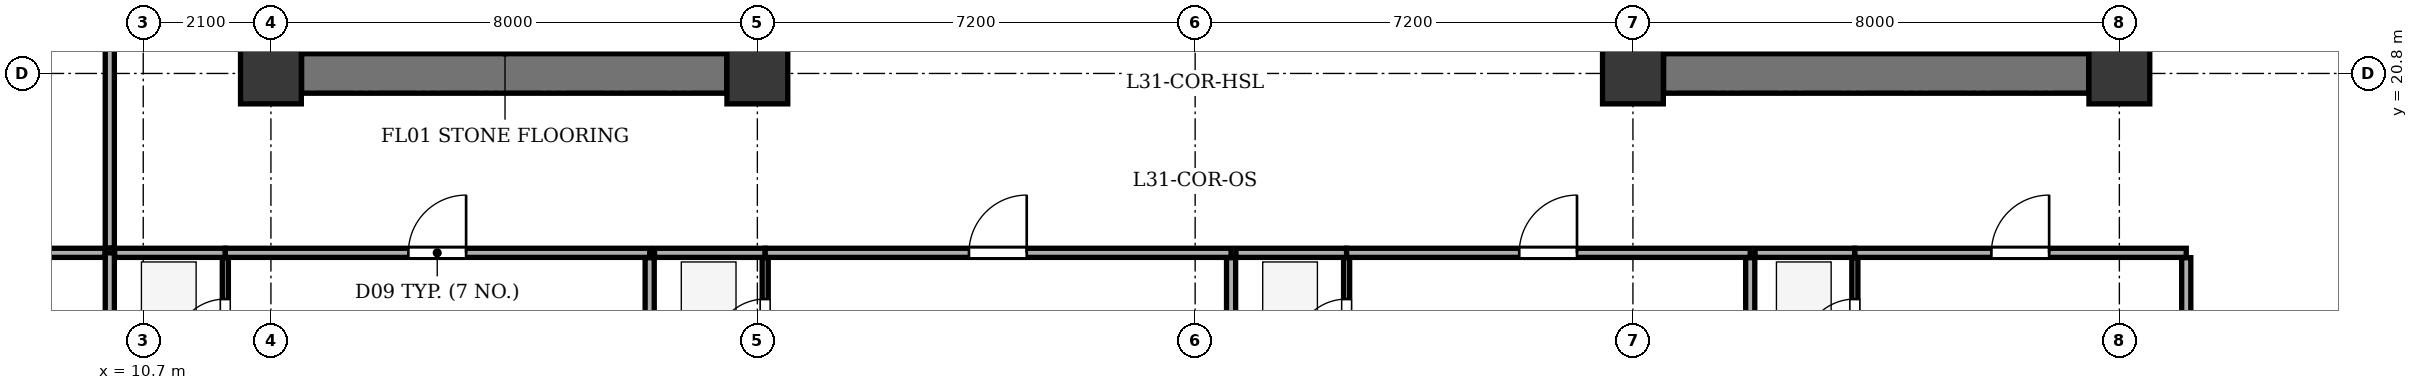
"""IFC4 building model, lengths in metres.
Left out: names, types, materials, properties, quantities, classifications, styles, units other than length and angle.
Written with IfcOpenShell. Run it as: python <this file> out.ifc"""

import sys

from ifc_helpers import new_model, si_unit, direction, frame, frame_2d, origin, origin_2d, place, context, subcontext, project, spatial, rectangle, extrude, element, fill, save


model = new_model("IFC4")
c1 = context("Model", 3, precision=1e-05, world=origin(), true_north=direction((0.0, 1.0)))
c2 = subcontext(c1, "Body", "Model", "MODEL_VIEW")
j1 = project(units=[si_unit("LENGTHUNIT", "METRE"), si_unit("PLANEANGLEUNIT", "RADIAN")], contexts=[c1])
p1 = place(None, origin())
s1 = spatial("IfcSite", under=j1, at=p1, CompositionType="ELEMENT")
p2 = place(p1, origin())
s2 = spatial("IfcBuilding", under=s1, at=p2, CompositionType="ELEMENT")
p3 = place(p2, frame((0.0, 0.0, 127.3)))
s3 = spatial("IfcBuildingStorey", under=s2, at=p3, CompositionType="ELEMENT", Elevation=127.3)
for number, where, z_axis, x_axis in (
    (1, (12.8, 20.8, 0.0), (0.0, 0.0, 1.0), (1.0, 0.0, 0.0)),
    (2, (20.8, 20.8, 0.0), (0.0, 0.0, 1.0), (1.0, 0.0, 0.0)),
    (3, (35.2, 20.8, 0.0), (0.0, 0.0, 1.0), (1.0, 0.0, 0.0)),
    (4, (43.2, 20.8, 0.0), (0.0, 0.0, 1.0), (1.0, 0.0, 0.0)),
):
    element("IfcColumn", number, at=place(p3, frame(where, z_axis=z_axis, x_axis=x_axis)), inside=s3, PredefinedType="COLUMN", context=c2, shape_type="SweptSolid", body=[
        extrude(rectangle(XDim=1.0, YDim=1.0, at=origin_2d()), origin(), (0.0, 0.0, 1.0), 3.5),
    ])
p4 = place(p3, frame((13.305, 20.8, 0.0), z_axis=(0.0, 0.0, 1.0), x_axis=(1.0, 0.0, 0.0)))
e5 = element("IfcWall", 5, at=p4, inside=s3, PredefinedType="SHEAR", context=c2, shape_type="SweptSolid", body=[
    extrude(rectangle(XDim=6.99, YDim=0.65, at=frame_2d((3.495, 0.0))), origin(), (0.0, 0.0, 1.0), 3.2),
])
p5 = place(p3, frame((16.435, 21.135, 0.0), z_axis=(0.0, 0.0, 1.0), x_axis=(0.0, 1.0, 0.0)))
e6 = element("IfcWall", 6, at=p5, inside=s3, PredefinedType="SHEAR", context=c2, shape_type="SweptSolid", body=[
    extrude(rectangle(XDim=12.13, YDim=0.25, at=frame_2d((6.065, 0.0))), origin(), (0.0, 0.0, 1.0), 3.2),
])
p6 = place(p5, frame((0.515, 0.0, 0.0)))
e7 = element("IfcOpeningElement", 7, at=p6, cuts=e6, PredefinedType="OPENING", context=c2, shape_type="SweptSolid", body=[
    extrude(rectangle(XDim=1.2, YDim=2.15, at=frame_2d((0.6, 1.075))), frame((0.0, 0.135, 0.0), z_axis=(0.0, -1.0, 0.0), x_axis=(1.0, 0.0, 0.0)), (0.0, 0.0, 1.0), 0.27),
])
p7 = place(p5, frame((2.665, 0.0, 0.0)))
e8 = element("IfcOpeningElement", 8, at=p7, cuts=e6, PredefinedType="OPENING", context=c2, shape_type="SweptSolid", body=[
    extrude(rectangle(XDim=1.15, YDim=2.15, at=frame_2d((0.575, 1.075))), frame((0.0, 0.135, 0.0), z_axis=(0.0, -1.0, 0.0), x_axis=(1.0, 0.0, 0.0)), (0.0, 0.0, 1.0), 0.27),
])
p8 = place(p3, frame((35.705, 20.8, 0.0), z_axis=(0.0, 0.0, 1.0), x_axis=(1.0, 0.0, 0.0)))
e9 = element("IfcWall", 9, at=p8, inside=s3, PredefinedType="SHEAR", context=c2, shape_type="SweptSolid", body=[
    extrude(rectangle(XDim=6.99, YDim=0.65, at=frame_2d((3.495, 0.0))), origin(), (0.0, 0.0, 1.0), 3.2),
])
p9 = place(p3, frame((39.565, 21.135, 0.0), z_axis=(0.0, 0.0, 1.0), x_axis=(0.0, 1.0, 0.0)))
e10 = element("IfcWall", 10, at=p9, inside=s3, PredefinedType="SHEAR", context=c2, shape_type="SweptSolid", body=[
    extrude(rectangle(XDim=12.13, YDim=0.25, at=frame_2d((6.065, 0.0))), origin(), (0.0, 0.0, 1.0), 3.2),
])
p10 = place(p9, frame((0.515, 0.0, 0.0)))
e11 = element("IfcOpeningElement", 11, at=p10, cuts=e10, PredefinedType="OPENING", context=c2, shape_type="SweptSolid", body=[
    extrude(rectangle(XDim=1.2, YDim=2.15, at=frame_2d((0.6, 1.075))), frame((0.0, 0.135, 0.0), z_axis=(0.0, -1.0, 0.0), x_axis=(1.0, 0.0, 0.0)), (0.0, 0.0, 1.0), 0.27),
])
p11 = place(p9, frame((2.665, 0.0, 0.0)))
e12 = element("IfcOpeningElement", 12, at=p11, cuts=e10, PredefinedType="OPENING", context=c2, shape_type="SweptSolid", body=[
    extrude(rectangle(XDim=1.15, YDim=2.15, at=frame_2d((0.575, 1.075))), frame((0.0, 0.135, 0.0), z_axis=(0.0, -1.0, 0.0), x_axis=(1.0, 0.0, 0.0)), (0.0, 0.0, 1.0), 0.27),
])
p12 = place(p3, frame((10.15, 1.875, 0.0), z_axis=(0.0, 0.0, 1.0), x_axis=(0.0, 1.0, 0.0)))
e13 = element("IfcWall", 13, at=p12, inside=s3, PredefinedType="PARTITIONING", context=c2, shape_type="SweptSolid", body=[
    extrude(rectangle(XDim=15.975, YDim=0.15, at=frame_2d((7.988, 0.0))), origin(), (0.0, 0.0, 1.0), 3.2),
])
p13 = place(p3, frame((10.23, 17.85, 0.0), z_axis=(0.0, 0.0, 1.0), x_axis=(1.0, 0.0, 0.0)))
e14 = element("IfcWall", 14, at=p13, inside=s3, PredefinedType="PARTITIONING", context=c2, shape_type="SweptSolid", body=[
    extrude(rectangle(XDim=1.82, YDim=0.15, at=frame_2d((0.91, 0.0))), origin(), (0.0, 0.0, 1.0), 3.2),
])
p14 = place(p3, frame((12.05, 17.85, 0.0), z_axis=(0.0, 0.0, 1.0), x_axis=(1.0, 0.0, 0.0)))
e15 = element("IfcWall", 15, at=p14, inside=s3, PredefinedType="PARTITIONING", context=c2, shape_type="SweptSolid", body=[
    extrude(rectangle(XDim=6.979, YDim=0.15, at=frame_2d((3.49, 0.0))), origin(), (0.0, 0.0, 1.0), 3.2),
])
p15 = place(p14, frame((3.01, 0.0, 0.0)))
e16 = element("IfcOpeningElement", 16, at=p15, cuts=e15, PredefinedType="OPENING", context=c2, shape_type="SweptSolid", body=[
    extrude(rectangle(XDim=0.95, YDim=2.1, at=frame_2d((0.475, 1.05))), frame((0.0, 0.085, 0.0), z_axis=(0.0, -1.0, 0.0), x_axis=(1.0, 0.0, 0.0)), (0.0, 0.0, 1.0), 0.17),
])
p16 = place(p3, frame((12.05, 15.52, 0.0), z_axis=(0.0, 0.0, 1.0), x_axis=(0.0, 1.0, 0.0)))
e17 = element("IfcWall", 17, at=p16, inside=s3, PredefinedType="PARTITIONING", context=c2, shape_type="SweptSolid", body=[
    extrude(rectangle(XDim=2.25, YDim=0.1, at=frame_2d((1.125, 0.0))), origin(), (0.0, 0.0, 1.0), 3.2),
])
p17 = place(p16, frame((0.72, 0.0, 0.0)))
e18 = element("IfcOpeningElement", 18, at=p17, cuts=e17, PredefinedType="OPENING", context=c2, shape_type="SweptSolid", body=[
    extrude(rectangle(XDim=0.85, YDim=2.05, at=frame_2d((0.425, 1.025))), frame((0.0, 0.06, 0.0), z_axis=(0.0, -1.0, 0.0), x_axis=(1.0, 0.0, 0.0)), (0.0, 0.0, 1.0), 0.12),
])
p18 = place(p3, frame((19.029, 1.875, 0.0), z_axis=(0.0, 0.0, 1.0), x_axis=(0.0, 1.0, 0.0)))
e19 = element("IfcWall", 19, at=p18, inside=s3, PredefinedType="PARTITIONING", context=c2, shape_type="SweptSolid", body=[
    extrude(rectangle(XDim=15.895, YDim=0.15, at=frame_2d((7.948, 0.0))), origin(), (0.0, 0.0, 1.0), 3.2),
])
p19 = place(p3, frame((19.109, 17.85, 0.0), z_axis=(0.0, 0.0, 1.0), x_axis=(1.0, 0.0, 0.0)))
e20 = element("IfcWall", 20, at=p19, inside=s3, PredefinedType="PARTITIONING", context=c2, shape_type="SweptSolid", body=[
    extrude(rectangle(XDim=1.82, YDim=0.15, at=frame_2d((0.91, 0.0))), origin(), (0.0, 0.0, 1.0), 3.2),
])
p20 = place(p3, frame((20.929, 17.85, 0.0), z_axis=(0.0, 0.0, 1.0), x_axis=(1.0, 0.0, 0.0)))
e21 = element("IfcWall", 21, at=p20, inside=s3, PredefinedType="PARTITIONING", context=c2, shape_type="SweptSolid", body=[
    extrude(rectangle(XDim=7.662, YDim=0.15, at=frame_2d((3.831, 0.0))), origin(), (0.0, 0.0, 1.0), 3.2),
])
p21 = place(p20, frame((3.351, 0.0, 0.0)))
e22 = element("IfcOpeningElement", 22, at=p21, cuts=e21, PredefinedType="OPENING", context=c2, shape_type="SweptSolid", body=[
    extrude(rectangle(XDim=0.95, YDim=2.1, at=frame_2d((0.475, 1.05))), frame((0.0, 0.085, 0.0), z_axis=(0.0, -1.0, 0.0), x_axis=(1.0, 0.0, 0.0)), (0.0, 0.0, 1.0), 0.17),
])
p22 = place(p3, frame((20.929, 15.52, 0.0), z_axis=(0.0, 0.0, 1.0), x_axis=(0.0, 1.0, 0.0)))
e23 = element("IfcWall", 23, at=p22, inside=s3, PredefinedType="PARTITIONING", context=c2, shape_type="SweptSolid", body=[
    extrude(rectangle(XDim=2.25, YDim=0.1, at=frame_2d((1.125, 0.0))), origin(), (0.0, 0.0, 1.0), 2.535),
])
p23 = place(p22, frame((0.72, 0.0, 0.0)))
e24 = element("IfcOpeningElement", 24, at=p23, cuts=e23, PredefinedType="OPENING", context=c2, shape_type="SweptSolid", body=[
    extrude(rectangle(XDim=0.85, YDim=2.05, at=frame_2d((0.425, 1.025))), frame((0.0, 0.06, 0.0), z_axis=(0.0, -1.0, 0.0), x_axis=(1.0, 0.0, 0.0)), (0.0, 0.0, 1.0), 0.12),
])
p24 = place(p3, frame((28.591, 1.875, 0.0), z_axis=(0.0, 0.0, 1.0), x_axis=(0.0, 1.0, 0.0)))
e25 = element("IfcWall", 25, at=p24, inside=s3, PredefinedType="PARTITIONING", context=c2, shape_type="SweptSolid", body=[
    extrude(rectangle(XDim=15.895, YDim=0.15, at=frame_2d((7.948, 0.0))), origin(), (0.0, 0.0, 1.0), 3.2),
])
p25 = place(p3, frame((28.671, 17.85, 0.0), z_axis=(0.0, 0.0, 1.0), x_axis=(1.0, 0.0, 0.0)))
e26 = element("IfcWall", 26, at=p25, inside=s3, PredefinedType="PARTITIONING", context=c2, shape_type="SweptSolid", body=[
    extrude(rectangle(XDim=1.82, YDim=0.15, at=frame_2d((0.91, 0.0))), origin(), (0.0, 0.0, 1.0), 3.2),
])
p26 = place(p3, frame((30.491, 17.85, 0.0), z_axis=(0.0, 0.0, 1.0), x_axis=(1.0, 0.0, 0.0)))
e27 = element("IfcWall", 27, at=p26, inside=s3, PredefinedType="PARTITIONING", context=c2, shape_type="SweptSolid", body=[
    extrude(rectangle(XDim=6.638, YDim=0.15, at=frame_2d((3.319, 0.0))), origin(), (0.0, 0.0, 1.0), 3.2),
])
p27 = place(p26, frame((2.839, 0.0, 0.0)))
e28 = element("IfcOpeningElement", 28, at=p27, cuts=e27, PredefinedType="OPENING", context=c2, shape_type="SweptSolid", body=[
    extrude(rectangle(XDim=0.95, YDim=2.1, at=frame_2d((0.475, 1.05))), frame((0.0, 0.085, 0.0), z_axis=(0.0, -1.0, 0.0), x_axis=(1.0, 0.0, 0.0)), (0.0, 0.0, 1.0), 0.17),
])
p28 = place(p3, frame((30.491, 15.52, 0.0), z_axis=(0.0, 0.0, 1.0), x_axis=(0.0, 1.0, 0.0)))
e29 = element("IfcWall", 29, at=p28, inside=s3, PredefinedType="PARTITIONING", context=c2, shape_type="SweptSolid", body=[
    extrude(rectangle(XDim=2.25, YDim=0.1, at=frame_2d((1.125, 0.0))), origin(), (0.0, 0.0, 1.0), 3.2),
])
p29 = place(p28, frame((0.72, 0.0, 0.0)))
e30 = element("IfcOpeningElement", 30, at=p29, cuts=e29, PredefinedType="OPENING", context=c2, shape_type="SweptSolid", body=[
    extrude(rectangle(XDim=0.85, YDim=2.05, at=frame_2d((0.425, 1.025))), frame((0.0, 0.06, 0.0), z_axis=(0.0, -1.0, 0.0), x_axis=(1.0, 0.0, 0.0)), (0.0, 0.0, 1.0), 0.12),
])
p30 = place(p3, frame((37.129, 1.875, 0.0), z_axis=(0.0, 0.0, 1.0), x_axis=(0.0, 1.0, 0.0)))
e31 = element("IfcWall", 31, at=p30, inside=s3, PredefinedType="PARTITIONING", context=c2, shape_type="SweptSolid", body=[
    extrude(rectangle(XDim=15.895, YDim=0.15, at=frame_2d((7.948, 0.0))), origin(), (0.0, 0.0, 1.0), 3.2),
])
p31 = place(p3, frame((37.209, 17.85, 0.0), z_axis=(0.0, 0.0, 1.0), x_axis=(1.0, 0.0, 0.0)))
e32 = element("IfcWall", 32, at=p31, inside=s3, PredefinedType="PARTITIONING", context=c2, shape_type="SweptSolid", body=[
    extrude(rectangle(XDim=1.641, YDim=0.15, at=frame_2d((0.821, 0.0))), origin(), (0.0, 0.0, 1.0), 3.2),
])
p32 = place(p3, frame((38.85, 17.85, 0.0), z_axis=(0.0, 0.0, 1.0), x_axis=(1.0, 0.0, 0.0)))
e33 = element("IfcWall", 33, at=p32, inside=s3, PredefinedType="PARTITIONING", context=c2, shape_type="SweptSolid", body=[
    extrude(rectangle(XDim=5.45, YDim=0.15, at=frame_2d((2.725, 0.0))), origin(), (0.0, 0.0, 1.0), 3.2),
])
p33 = place(p32, frame((2.245, 0.0, 0.0)))
e34 = element("IfcOpeningElement", 34, at=p33, cuts=e33, PredefinedType="OPENING", context=c2, shape_type="SweptSolid", body=[
    extrude(rectangle(XDim=0.95, YDim=2.1, at=frame_2d((0.475, 1.05))), frame((0.0, 0.085, 0.0), z_axis=(0.0, -1.0, 0.0), x_axis=(1.0, 0.0, 0.0)), (0.0, 0.0, 1.0), 0.17),
])
p34 = place(p3, frame((38.85, 15.52, 0.0), z_axis=(0.0, 0.0, 1.0), x_axis=(0.0, 1.0, 0.0)))
e35 = element("IfcWall", 35, at=p34, inside=s3, PredefinedType="PARTITIONING", context=c2, shape_type="SweptSolid", body=[
    extrude(rectangle(XDim=2.25, YDim=0.1, at=frame_2d((1.125, 0.0))), origin(), (0.0, 0.0, 1.0), 3.2),
])
p35 = place(p34, frame((0.72, 0.0, 0.0)))
e36 = element("IfcOpeningElement", 36, at=p35, cuts=e35, PredefinedType="OPENING", context=c2, shape_type="SweptSolid", body=[
    extrude(rectangle(XDim=0.85, YDim=2.05, at=frame_2d((0.425, 1.025))), frame((0.0, 0.06, 0.0), z_axis=(0.0, -1.0, 0.0), x_axis=(1.0, 0.0, 0.0)), (0.0, 0.0, 1.0), 0.12),
])
p36 = place(p3, frame((44.3, 1.875, 0.0), z_axis=(0.0, 0.0, 1.0), x_axis=(0.0, 1.0, 0.0)))
e37 = element("IfcWall", 37, at=p36, inside=s3, PredefinedType="PARTITIONING", context=c2, shape_type="SweptSolid", body=[
    extrude(rectangle(XDim=15.895, YDim=0.15, at=frame_2d((7.948, 0.0))), origin(), (0.0, 0.0, 1.0), 3.2),
])
p37 = place(p3, frame((4.675, 17.85, 0.0), z_axis=(0.0, 0.0, 1.0), x_axis=(1.0, 0.0, 0.0)))
e38 = element("IfcWall", 38, at=p37, inside=s3, PredefinedType="PARTITIONING", context=c2, shape_type="SweptSolid", body=[
    extrude(rectangle(XDim=5.395, YDim=0.15, at=frame_2d((2.698, 0.0))), origin(), (0.0, 0.0, 1.0), 3.2),
])
p38 = place(p3, frame((10.15, 17.93, 0.0), z_axis=(0.0, 0.0, 1.0), x_axis=(0.0, 1.0, 0.0)))
e39 = element("IfcWall", 39, at=p38, inside=s3, PredefinedType="PARTITIONING", context=c2, shape_type="SweptSolid", body=[
    extrude(rectangle(XDim=18.54, YDim=0.15, at=frame_2d((9.27, 0.0))), origin(), (0.0, 0.0, 1.0), 3.2),
])
p39 = place(p38, frame((8.79, 0.0, 0.0)))
e40 = element("IfcOpeningElement", 40, at=p39, cuts=e39, PredefinedType="OPENING", context=c2, shape_type="SweptSolid", body=[
    extrude(rectangle(XDim=0.95, YDim=2.1, at=frame_2d((0.475, 1.05))), frame((0.0, 0.085, 0.0), z_axis=(0.0, -1.0, 0.0), x_axis=(1.0, 0.0, 0.0)), (0.0, 0.0, 1.0), 0.17),
])
p40 = place(p17, origin())
e41 = element("IfcDoor", 41, at=p40, inside=s3, OperationType="SINGLE_SWING_LEFT", PredefinedType="DOOR", context=c2, shape_type="SweptSolid", body=[
    extrude(rectangle(XDim=0.85, YDim=2.05, at=frame_2d((0.425, 1.025))), frame((0.0, 0.025, 0.0), z_axis=(0.0, -1.0, 0.0), x_axis=(1.0, 0.0, 0.0)), (0.0, 0.0, 1.0), 0.05),
])
fill(e18, e41)
p41 = place(p15, origin())
e42 = element("IfcDoor", 42, at=p41, inside=s3, OperationType="SINGLE_SWING_RIGHT", PredefinedType="DOOR", context=c2, shape_type="SweptSolid", body=[
    extrude(rectangle(XDim=0.95, YDim=2.1, at=frame_2d((0.475, 1.05))), frame((0.0, 0.025, 0.0), z_axis=(0.0, -1.0, 0.0), x_axis=(1.0, 0.0, 0.0)), (0.0, 0.0, 1.0), 0.05),
])
fill(e16, e42)
p42 = place(p23, origin())
e43 = element("IfcDoor", 43, at=p42, inside=s3, OperationType="SINGLE_SWING_LEFT", PredefinedType="DOOR", context=c2, shape_type="SweptSolid", body=[
    extrude(rectangle(XDim=0.85, YDim=2.05, at=frame_2d((0.425, 1.025))), frame((0.0, 0.025, 0.0), z_axis=(0.0, -1.0, 0.0), x_axis=(1.0, 0.0, 0.0)), (0.0, 0.0, 1.0), 0.05),
])
fill(e24, e43)
p43 = place(p21, origin())
e44 = element("IfcDoor", 44, at=p43, inside=s3, OperationType="SINGLE_SWING_RIGHT", PredefinedType="DOOR", context=c2, shape_type="SweptSolid", body=[
    extrude(rectangle(XDim=0.95, YDim=2.1, at=frame_2d((0.475, 1.05))), frame((0.0, 0.025, 0.0), z_axis=(0.0, -1.0, 0.0), x_axis=(1.0, 0.0, 0.0)), (0.0, 0.0, 1.0), 0.05),
])
fill(e22, e44)
p44 = place(p29, origin())
e45 = element("IfcDoor", 45, at=p44, inside=s3, OperationType="SINGLE_SWING_LEFT", PredefinedType="DOOR", context=c2, shape_type="SweptSolid", body=[
    extrude(rectangle(XDim=0.85, YDim=2.05, at=frame_2d((0.425, 1.025))), frame((0.0, 0.025, 0.0), z_axis=(0.0, -1.0, 0.0), x_axis=(1.0, 0.0, 0.0)), (0.0, 0.0, 1.0), 0.05),
])
fill(e30, e45)
p45 = place(p27, origin())
e46 = element("IfcDoor", 46, at=p45, inside=s3, OperationType="SINGLE_SWING_RIGHT", PredefinedType="DOOR", context=c2, shape_type="SweptSolid", body=[
    extrude(rectangle(XDim=0.95, YDim=2.1, at=frame_2d((0.475, 1.05))), frame((0.0, 0.025, 0.0), z_axis=(0.0, -1.0, 0.0), x_axis=(1.0, 0.0, 0.0)), (0.0, 0.0, 1.0), 0.05),
])
fill(e28, e46)
p46 = place(p35, origin())
e47 = element("IfcDoor", 47, at=p46, inside=s3, OperationType="SINGLE_SWING_LEFT", PredefinedType="DOOR", context=c2, shape_type="SweptSolid", body=[
    extrude(rectangle(XDim=0.85, YDim=2.05, at=frame_2d((0.425, 1.025))), frame((0.0, 0.025, 0.0), z_axis=(0.0, -1.0, 0.0), x_axis=(1.0, 0.0, 0.0)), (0.0, 0.0, 1.0), 0.05),
])
fill(e36, e47)
p47 = place(p33, origin())
e48 = element("IfcDoor", 48, at=p47, inside=s3, OperationType="SINGLE_SWING_RIGHT", PredefinedType="DOOR", context=c2, shape_type="SweptSolid", body=[
    extrude(rectangle(XDim=0.95, YDim=2.1, at=frame_2d((0.475, 1.05))), frame((0.0, 0.025, 0.0), z_axis=(0.0, -1.0, 0.0), x_axis=(1.0, 0.0, 0.0)), (0.0, 0.0, 1.0), 0.05),
])
fill(e34, e48)
save(model, sys.argv[1])
